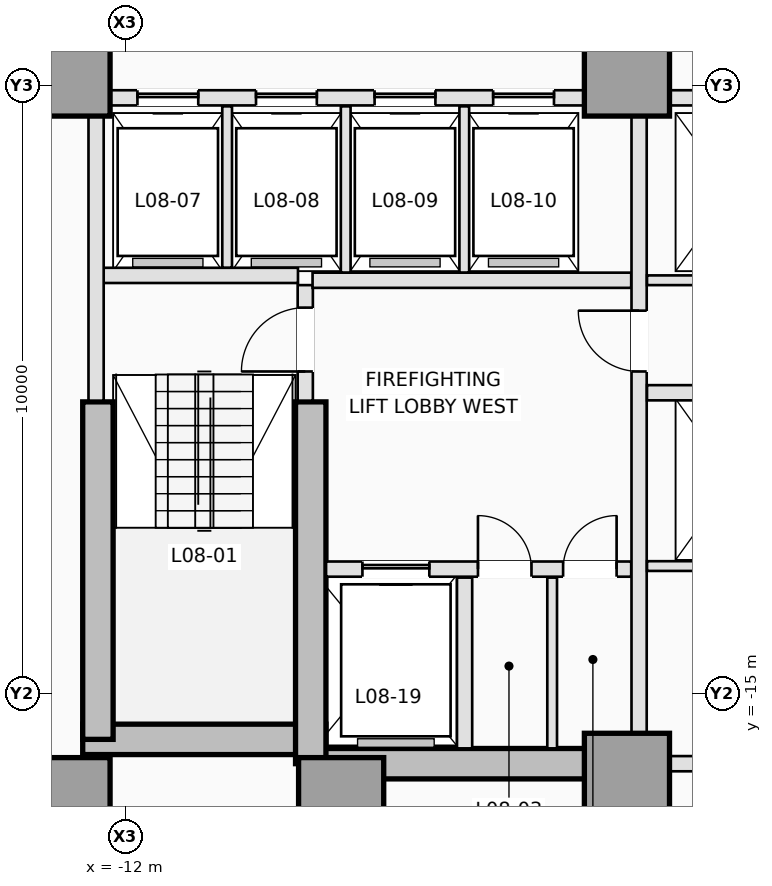
"""IFC4 building model, lengths in metres.
Left out: names, types, materials, properties, quantities, classifications, styles, units other than length and angle.
Written with IfcOpenShell. Run it as: python <this file> out.ifc"""

import sys

from ifc_helpers import new_model, si_unit, direction, frame, frame_2d, origin, origin_2d, place, context, subcontext, project, spatial, rectangle, extrude, element, fill, save


model = new_model("IFC4")
c1 = context("Model", 3, precision=1e-05, world=origin(), true_north=direction((0.0, 1.0)))
c2 = subcontext(c1, "Body", "Model", "MODEL_VIEW")
j1 = project(units=[si_unit("LENGTHUNIT", "METRE"), si_unit("PLANEANGLEUNIT", "RADIAN")], contexts=[c1])
p1 = place(None, origin())
s1 = spatial("IfcSite", under=j1, at=p1, CompositionType="ELEMENT")
p2 = place(p1, origin())
s2 = spatial("IfcBuilding", under=s1, at=p2, CompositionType="ELEMENT")
p3 = place(p2, frame((0.0, 0.0, 34.6)))
s3 = spatial("IfcBuildingStorey", under=s2, at=p3, CompositionType="ELEMENT", Elevation=34.6)
p4 = place(p3, frame((-12.7, -15.75, 0.0), z_axis=(0.0, 0.0, 1.0), x_axis=(1.0, 0.0, 0.0)))
e1 = element("IfcWall", 1, at=p4, inside=s3, PredefinedType="SHEAR", context=c2, shape_type="SweptSolid", body=[
    extrude(rectangle(XDim=4.0, YDim=0.5, at=frame_2d((2.0, 0.0))), origin(), (0.0, 0.0, 1.0), 3.5),
])
p5 = place(p3, frame((-8.95, -16.15, 0.0), z_axis=(0.0, 0.0, 1.0), x_axis=(1.0, 0.0, 0.0)))
e2 = element("IfcWall", 2, at=p5, inside=s3, PredefinedType="SHEAR", context=c2, shape_type="SweptSolid", body=[
    extrude(rectangle(XDim=5.2, YDim=0.5, at=frame_2d((2.6, 0.0))), origin(), (0.0, 0.0, 1.0), 3.5),
])
p6 = place(p3, frame((-12.45, -15.75, 0.0), z_axis=(0.0, 0.0, 1.0), x_axis=(0.0, 1.0, 0.0)))
e3 = element("IfcWall", 3, at=p6, inside=s3, PredefinedType="SHEAR", context=c2, shape_type="SweptSolid", body=[
    extrude(rectangle(XDim=5.55, YDim=0.5, at=frame_2d((2.775, 0.0))), origin(), (0.0, 0.0, 1.0), 3.5),
])
p7 = place(p3, frame((-8.95, -16.15, 0.0), z_axis=(0.0, 0.0, 1.0), x_axis=(0.0, 1.0, 0.0)))
e4 = element("IfcWall", 4, at=p7, inside=s3, PredefinedType="SHEAR", context=c2, shape_type="SweptSolid", body=[
    extrude(rectangle(XDim=5.95, YDim=0.5, at=frame_2d((2.975, 0.0))), origin(), (0.0, 0.0, 1.0), 3.5),
])
for number, where, z_axis, x_axis in (
    (5, (-12.95, -16.75, 0.0), (0.0, 0.0, 1.0), (1.0, 0.0, 0.0)),
    (6, (-8.45, -16.75, 0.0), (0.0, 0.0, 1.0), (1.0, 0.0, 0.0)),
    (7, (-3.75, -16.35, 0.0), (0.0, 0.0, 1.0), (1.0, 0.0, 0.0)),
    (8, (-12.95, -4.8, 0.0), (0.0, 0.0, 1.0), (1.0, 0.0, 0.0)),
    (9, (-3.75, -4.8, 0.0), (0.0, 0.0, 1.0), (1.0, 0.0, 0.0)),
):
    element("IfcColumn", number, at=place(p3, frame(where, z_axis=z_axis, x_axis=x_axis)), inside=s3, PredefinedType="COLUMN", context=c2, shape_type="SweptSolid", body=[
        extrude(rectangle(XDim=1.4, YDim=1.4, at=origin_2d()), origin(), (0.0, 0.0, 1.0), 3.5),
    ])
p8 = place(p3, frame((-9.04, -10.18, 0.0), z_axis=(0.0, 0.0, 1.0), x_axis=(0.0, 1.0, 0.0)))
e10 = element("IfcWall", 10, at=p8, inside=s3, PredefinedType="PARTITIONING", context=c2, shape_type="SweptSolid", body=[
    extrude(rectangle(XDim=1.9, YDim=0.25, at=frame_2d((0.95, 0.0))), origin(), (0.0, 0.0, 1.0), 3.25),
])
p9 = place(p8, frame((0.48, 0.0, 0.0)))
e11 = element("IfcOpeningElement", 11, at=p9, cuts=e10, PredefinedType="OPENING", context=c2, shape_type="SweptSolid", body=[
    extrude(rectangle(XDim=1.05, YDim=2.15, at=frame_2d((0.525, 1.075))), frame((0.0, 0.135, 0.0), z_axis=(0.0, -1.0, 0.0), x_axis=(1.0, 0.0, 0.0)), (0.0, 0.0, 1.0), 0.27),
])
p10 = place(p3, frame((-12.38, -8.12, 0.0), z_axis=(0.0, 0.0, 1.0), x_axis=(1.0, 0.0, 0.0)))
e12 = element("IfcWall", 12, at=p10, inside=s3, PredefinedType="PARTITIONING", context=c2, shape_type="SweptSolid", body=[
    extrude(rectangle(XDim=3.22, YDim=0.25, at=frame_2d((1.61, 0.0))), origin(), (0.0, 0.0, 1.0), 3.25),
])
p11 = place(p3, frame((-12.48, -10.18, 0.0), z_axis=(0.0, 0.0, 1.0), x_axis=(0.0, 1.0, 0.0)))
e13 = element("IfcWall", 13, at=p11, inside=s3, PredefinedType="PARTITIONING", context=c2, shape_type="SweptSolid", body=[
    extrude(rectangle(XDim=4.678, YDim=0.25, at=frame_2d((2.339, 0.0))), origin(), (0.0, 0.0, 1.0), 3.25),
])
p12 = place(p3, frame((-8.698, -12.95, 0.0), z_axis=(0.0, 0.0, 1.0), x_axis=(1.0, 0.0, 0.0)))
e14 = element("IfcWall", 14, at=p12, inside=s3, PredefinedType="PARTITIONING", context=c2, shape_type="SweptSolid", body=[
    extrude(rectangle(XDim=5.018, YDim=0.25, at=frame_2d((2.509, 0.0))), origin(), (0.0, 0.0, 1.0), 3.25),
])
p13 = place(p12, frame((0.598, 0.0, 0.0)))
e15 = element("IfcOpeningElement", 15, at=p13, cuts=e14, PredefinedType="OPENING", context=c2, shape_type="SweptSolid", body=[
    extrude(rectangle(XDim=1.1, YDim=2.15, at=frame_2d((0.55, 1.075))), frame((0.0, 0.135, 0.0), z_axis=(0.0, -1.0, 0.0), x_axis=(1.0, 0.0, 0.0)), (0.0, 0.0, 1.0), 0.27),
])
p14 = place(p12, frame((2.498, 0.0, 0.0)))
e16 = element("IfcOpeningElement", 16, at=p14, cuts=e14, PredefinedType="OPENING", context=c2, shape_type="SweptSolid", body=[
    extrude(rectangle(XDim=0.88, YDim=2.1, at=frame_2d((0.44, 1.05))), frame((0.0, 0.135, 0.0), z_axis=(0.0, -1.0, 0.0), x_axis=(1.0, 0.0, 0.0)), (0.0, 0.0, 1.0), 0.27),
])
p15 = place(p12, frame((3.898, 0.0, 0.0)))
e17 = element("IfcOpeningElement", 17, at=p15, cuts=e14, PredefinedType="OPENING", context=c2, shape_type="SweptSolid", body=[
    extrude(rectangle(XDim=0.88, YDim=2.1, at=frame_2d((0.44, 1.05))), frame((0.0, 0.135, 0.0), z_axis=(0.0, -1.0, 0.0), x_axis=(1.0, 0.0, 0.0)), (0.0, 0.0, 1.0), 0.27),
])
p16 = place(p3, frame((-6.42, -15.898, 0.0), z_axis=(0.0, 0.0, 1.0), x_axis=(0.0, 1.0, 0.0)))
e18 = element("IfcWall", 18, at=p16, inside=s3, PredefinedType="PARTITIONING", context=c2, shape_type="SweptSolid", body=[
    extrude(rectangle(XDim=2.808, YDim=0.25, at=frame_2d((1.404, 0.0))), origin(), (0.0, 0.0, 1.0), 3.25),
])
p17 = place(p3, frame((-4.98, -15.898, 0.0), z_axis=(0.0, 0.0, 1.0), x_axis=(0.0, 1.0, 0.0)))
e19 = element("IfcWall", 19, at=p17, inside=s3, PredefinedType="PARTITIONING", context=c2, shape_type="SweptSolid", body=[
    extrude(rectangle(XDim=2.808, YDim=0.16, at=frame_2d((1.404, 0.0))), origin(), (0.0, 0.0, 1.0), 3.25),
])
p18 = place(p3, frame((-8.92, -8.2, 0.0), z_axis=(0.0, 0.0, 1.0), x_axis=(1.0, 0.0, 0.0)))
e20 = element("IfcWall", 20, at=p18, inside=s3, PredefinedType="PARTITIONING", context=c2, shape_type="SweptSolid", body=[
    extrude(rectangle(XDim=5.24, YDim=0.25, at=frame_2d((2.62, 0.0))), origin(), (0.0, 0.0, 1.0), 3.25),
])
p19 = place(p3, frame((-3.55, -15.648, 0.0), z_axis=(0.0, 0.0, 1.0), x_axis=(0.0, 1.0, 0.0)))
e21 = element("IfcWall", 21, at=p19, inside=s3, PredefinedType="PARTITIONING", context=c2, shape_type="SweptSolid", body=[
    extrude(rectangle(XDim=10.146, YDim=0.25, at=frame_2d((5.073, 0.0))), origin(), (0.0, 0.0, 1.0), 3.25),
])
p20 = place(p19, frame((5.948, 0.0, 0.0)))
e22 = element("IfcOpeningElement", 22, at=p20, cuts=e21, PredefinedType="OPENING", context=c2, shape_type="SweptSolid", body=[
    extrude(rectangle(XDim=1.0, YDim=2.15, at=frame_2d((0.5, 1.075))), frame((0.0, 0.135, 0.0), z_axis=(0.0, -1.0, 0.0), x_axis=(1.0, 0.0, 0.0)), (0.0, 0.0, 1.0), 0.27),
])
p21 = place(p3, frame((-12.248, -5.2, 0.0), z_axis=(0.0, 0.0, 1.0), x_axis=(1.0, 0.0, 0.0)))
e23 = element("IfcWall", 23, at=p21, inside=s3, PredefinedType="PARTITIONING", context=c2, shape_type="SweptSolid", body=[
    extrude(rectangle(XDim=7.796, YDim=0.25, at=frame_2d((3.898, 0.0))), origin(), (0.0, 0.0, 1.0), 3.25),
])
p22 = place(p21, frame((0.448, 0.0, 0.0)))
e24 = element("IfcOpeningElement", 24, at=p22, cuts=e23, PredefinedType="OPENING", context=c2, shape_type="SweptSolid", body=[
    extrude(rectangle(XDim=1.0, YDim=2.15, at=frame_2d((0.5, 1.075))), frame((0.0, 0.135, 0.0), z_axis=(0.0, -1.0, 0.0), x_axis=(1.0, 0.0, 0.0)), (0.0, 0.0, 1.0), 0.27),
])
p23 = place(p21, frame((2.398, 0.0, 0.0)))
e25 = element("IfcOpeningElement", 25, at=p23, cuts=e23, PredefinedType="OPENING", context=c2, shape_type="SweptSolid", body=[
    extrude(rectangle(XDim=1.0, YDim=2.15, at=frame_2d((0.5, 1.075))), frame((0.0, 0.135, 0.0), z_axis=(0.0, -1.0, 0.0), x_axis=(1.0, 0.0, 0.0)), (0.0, 0.0, 1.0), 0.27),
])
p24 = place(p21, frame((4.348, 0.0, 0.0)))
e26 = element("IfcOpeningElement", 26, at=p24, cuts=e23, PredefinedType="OPENING", context=c2, shape_type="SweptSolid", body=[
    extrude(rectangle(XDim=1.0, YDim=2.15, at=frame_2d((0.5, 1.075))), frame((0.0, 0.135, 0.0), z_axis=(0.0, -1.0, 0.0), x_axis=(1.0, 0.0, 0.0)), (0.0, 0.0, 1.0), 0.27),
])
p25 = place(p21, frame((6.298, 0.0, 0.0)))
e27 = element("IfcOpeningElement", 27, at=p25, cuts=e23, PredefinedType="OPENING", context=c2, shape_type="SweptSolid", body=[
    extrude(rectangle(XDim=1.0, YDim=2.15, at=frame_2d((0.5, 1.075))), frame((0.0, 0.135, 0.0), z_axis=(0.0, -1.0, 0.0), x_axis=(1.0, 0.0, 0.0)), (0.0, 0.0, 1.0), 0.27),
])
p26 = place(p3, frame((-3.048, -5.2, 0.0), z_axis=(0.0, 0.0, 1.0), x_axis=(1.0, 0.0, 0.0)))
e28 = element("IfcWall", 28, at=p26, inside=s3, PredefinedType="PARTITIONING", context=c2, shape_type="SweptSolid", body=[
    extrude(rectangle(XDim=2.098, YDim=0.25, at=frame_2d((1.049, 0.0))), origin(), (0.0, 0.0, 1.0), 3.25),
])
p27 = place(p3, frame((-10.325, -7.993, 0.0), z_axis=(0.0, 0.0, 1.0), x_axis=(0.0, 1.0, 0.0)))
e29 = element("IfcWall", 29, at=p27, inside=s3, PredefinedType="PARTITIONING", context=c2, shape_type="SweptSolid", body=[
    extrude(rectangle(XDim=2.653, YDim=0.16, at=frame_2d((1.326, 0.0))), origin(), (0.0, 0.0, 1.0), 3.25),
])
for number, where, z_axis, x_axis in (
    (30, (-8.375, -8.073, 0.0), (0.0, 0.0, 1.0), (0.0, 1.0, 0.0)),
    (31, (-6.425, -8.073, 0.0), (0.0, 0.0, 1.0), (0.0, 1.0, 0.0)),
):
    element("IfcWall", number, at=place(p3, frame(where, z_axis=z_axis, x_axis=x_axis)), inside=s3, PredefinedType="PARTITIONING", context=c2, shape_type="SweptSolid", body=[
        extrude(rectangle(XDim=2.733, YDim=0.16, at=frame_2d((1.366, 0.0))), origin(), (0.0, 0.0, 1.0), 3.25),
    ])
p28 = place(p3, frame((-3.048, -16.15, 0.0), z_axis=(0.0, 0.0, 1.0), x_axis=(1.0, 0.0, 0.0)))
e32 = element("IfcWall", 32, at=p28, inside=s3, PredefinedType="PARTITIONING", context=c2, shape_type="SweptSolid", body=[
    extrude(rectangle(XDim=6.096, YDim=0.25, at=frame_2d((3.048, 0.0))), origin(), (0.0, 0.0, 1.0), 2.3),
])
p29 = place(p3, frame((-3.42, -8.2, 0.0), z_axis=(0.0, 0.0, 1.0), x_axis=(1.0, 0.0, 0.0)))
e33 = element("IfcWall", 33, at=p29, inside=s3, PredefinedType="PARTITIONING", context=c2, shape_type="SweptSolid", body=[
    extrude(rectangle(XDim=2.47, YDim=0.16, at=frame_2d((1.235, 0.0))), origin(), (0.0, 0.0, 1.0), 3.25),
])
p30 = place(p3, frame((-3.42, -10.05, 0.0), z_axis=(0.0, 0.0, 1.0), x_axis=(1.0, 0.0, 0.0)))
e34 = element("IfcWall", 34, at=p30, inside=s3, PredefinedType="PARTITIONING", context=c2, shape_type="SweptSolid", body=[
    extrude(rectangle(XDim=2.47, YDim=0.25, at=frame_2d((1.235, 0.0))), origin(), (0.0, 0.0, 1.0), 3.25),
])
p31 = place(p3, frame((-3.42, -12.9, 0.0), z_axis=(0.0, 0.0, 1.0), x_axis=(1.0, 0.0, 0.0)))
e35 = element("IfcWall", 35, at=p31, inside=s3, PredefinedType="PARTITIONING", context=c2, shape_type="SweptSolid", body=[
    extrude(rectangle(XDim=6.84, YDim=0.16, at=frame_2d((3.42, 0.0))), origin(), (0.0, 0.0, 1.0), 3.25),
])
p32 = place(p31, frame((2.98, 0.0, 0.0)))
e36 = element("IfcOpeningElement", 36, at=p32, cuts=e35, PredefinedType="OPENING", context=c2, shape_type="SweptSolid", body=[
    extrude(rectangle(XDim=0.88, YDim=2.12, at=frame_2d((0.44, 1.06))), frame((0.0, 0.09, 0.0), z_axis=(0.0, -1.0, 0.0), x_axis=(1.0, 0.0, 0.0)), (0.0, 0.0, 1.0), 0.18),
])
p33 = place(p22, origin())
e37 = element("IfcDoor", 37, at=p33, inside=s3, OperationType="SLIDING_TO_LEFT", PredefinedType="DOOR", context=c2, shape_type="SweptSolid", body=[
    extrude(rectangle(XDim=1.0, YDim=2.15, at=frame_2d((0.5, 1.075))), frame((0.0, 0.025, 0.0), z_axis=(0.0, -1.0, 0.0), x_axis=(1.0, 0.0, 0.0)), (0.0, 0.0, 1.0), 0.05),
])
fill(e24, e37)
p34 = place(p23, origin())
e38 = element("IfcDoor", 38, at=p34, inside=s3, OperationType="SLIDING_TO_LEFT", PredefinedType="DOOR", context=c2, shape_type="SweptSolid", body=[
    extrude(rectangle(XDim=1.0, YDim=2.15, at=frame_2d((0.5, 1.075))), frame((0.0, 0.025, 0.0), z_axis=(0.0, -1.0, 0.0), x_axis=(1.0, 0.0, 0.0)), (0.0, 0.0, 1.0), 0.05),
])
fill(e25, e38)
p35 = place(p24, origin())
e39 = element("IfcDoor", 39, at=p35, inside=s3, OperationType="SLIDING_TO_LEFT", PredefinedType="DOOR", context=c2, shape_type="SweptSolid", body=[
    extrude(rectangle(XDim=1.0, YDim=2.15, at=frame_2d((0.5, 1.075))), frame((0.0, 0.025, 0.0), z_axis=(0.0, -1.0, 0.0), x_axis=(1.0, 0.0, 0.0)), (0.0, 0.0, 1.0), 0.05),
])
fill(e26, e39)
p36 = place(p25, origin())
e40 = element("IfcDoor", 40, at=p36, inside=s3, OperationType="SLIDING_TO_LEFT", PredefinedType="DOOR", context=c2, shape_type="SweptSolid", body=[
    extrude(rectangle(XDim=1.0, YDim=2.15, at=frame_2d((0.5, 1.075))), frame((0.0, 0.025, 0.0), z_axis=(0.0, -1.0, 0.0), x_axis=(1.0, 0.0, 0.0)), (0.0, 0.0, 1.0), 0.05),
])
fill(e27, e40)
p37 = place(p13, origin())
e41 = element("IfcDoor", 41, at=p37, inside=s3, OperationType="SLIDING_TO_LEFT", PredefinedType="DOOR", context=c2, shape_type="SweptSolid", body=[
    extrude(rectangle(XDim=1.1, YDim=2.15, at=frame_2d((0.55, 1.075))), frame((0.0, 0.025, 0.0), z_axis=(0.0, -1.0, 0.0), x_axis=(1.0, 0.0, 0.0)), (0.0, 0.0, 1.0), 0.05),
])
fill(e15, e41)
p38 = place(p9, origin())
e42 = element("IfcDoor", 42, at=p38, inside=s3, OperationType="SINGLE_SWING_LEFT", PredefinedType="DOOR", context=c2, shape_type="SweptSolid", body=[
    extrude(rectangle(XDim=1.05, YDim=2.15, at=frame_2d((0.525, 1.075))), frame((0.0, 0.025, 0.0), z_axis=(0.0, -1.0, 0.0), x_axis=(1.0, 0.0, 0.0)), (0.0, 0.0, 1.0), 0.05),
])
fill(e11, e42)
p39 = place(p14, origin())
e43 = element("IfcDoor", 43, at=p39, inside=s3, OperationType="SINGLE_SWING_LEFT", PredefinedType="TRAPDOOR", context=c2, shape_type="SweptSolid", body=[
    extrude(rectangle(XDim=0.88, YDim=2.1, at=frame_2d((0.44, 1.05))), frame((0.0, 0.025, 0.0), z_axis=(0.0, -1.0, 0.0), x_axis=(1.0, 0.0, 0.0)), (0.0, 0.0, 1.0), 0.05),
])
fill(e16, e43)
p40 = place(p15, origin())
e44 = element("IfcDoor", 44, at=p40, inside=s3, OperationType="SINGLE_SWING_RIGHT", PredefinedType="TRAPDOOR", context=c2, shape_type="SweptSolid", body=[
    extrude(rectangle(XDim=0.88, YDim=2.1, at=frame_2d((0.44, 1.05))), frame((0.0, 0.025, 0.0), z_axis=(0.0, -1.0, 0.0), x_axis=(1.0, 0.0, 0.0)), (0.0, 0.0, 1.0), 0.05),
])
fill(e17, e44)
p41 = place(p20, origin())
e45 = element("IfcDoor", 45, at=p41, inside=s3, OperationType="SINGLE_SWING_RIGHT", PredefinedType="DOOR", context=c2, shape_type="SweptSolid", body=[
    extrude(rectangle(XDim=1.0, YDim=2.15, at=frame_2d((0.5, 1.075))), frame((0.0, 0.025, 0.0), z_axis=(0.0, -1.0, 0.0), x_axis=(1.0, 0.0, 0.0)), (0.0, 0.0, 1.0), 0.05),
])
fill(e22, e45)
save(model, sys.argv[1])
